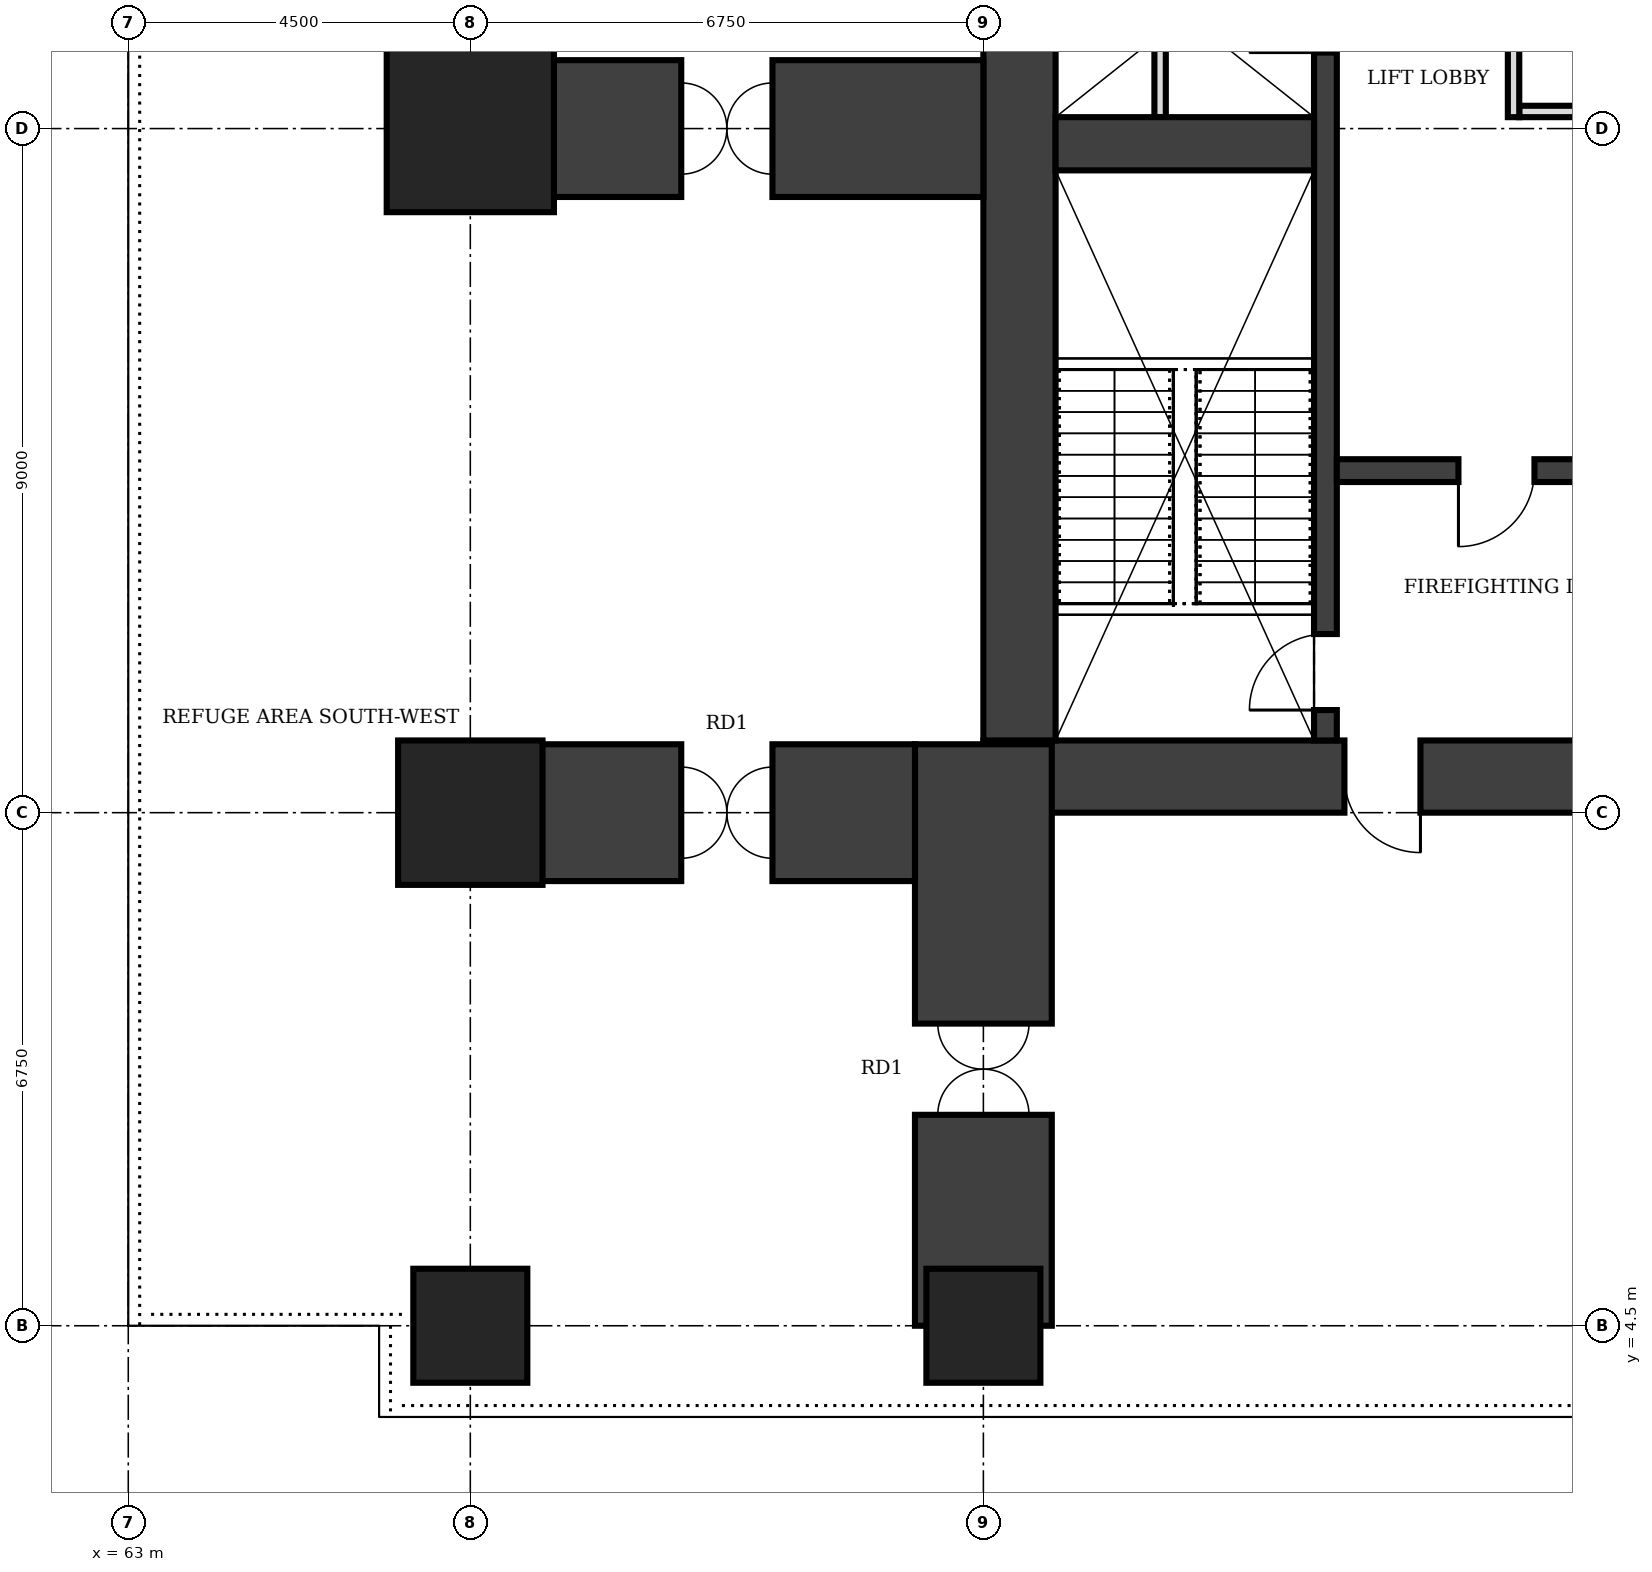
"""IFC4 building model, lengths in metres.
Left out: names, types, materials, properties, quantities, classifications, styles, units other than length and angle.
Written with IfcOpenShell. Run it as: python <this file> out.ifc"""

import sys

from ifc_helpers import new_model, si_unit, direction, frame, frame_2d, origin, origin_2d, place, context, subcontext, project, spatial, rectangle, extrude, element, fill, save


model = new_model("IFC4")
c1 = context("Model", 3, precision=1e-05, world=origin(), true_north=direction((0.0, 1.0)))
c2 = subcontext(c1, "Body", "Model", "MODEL_VIEW")
j1 = project(units=[si_unit("LENGTHUNIT", "METRE"), si_unit("PLANEANGLEUNIT", "RADIAN")], contexts=[c1])
p1 = place(None, origin())
s1 = spatial("IfcSite", under=j1, at=p1, CompositionType="ELEMENT")
p2 = place(p1, origin())
s2 = spatial("IfcBuilding", under=s1, at=p2, CompositionType="ELEMENT")
p3 = place(p2, frame((0.0, 0.0, 169.0)))
s3 = spatial("IfcBuildingStorey", under=s2, at=p3, CompositionType="ELEMENT", Elevation=169.0)
p4 = place(p3, frame((74.25, 11.725, 0.0), z_axis=(0.0, 0.0, 1.0), x_axis=(1.0, 0.0, 0.0)))
e1 = element("IfcWall", 1, at=p4, inside=s3, PredefinedType="SHEAR", context=c2, shape_type="SweptSolid", body=[
    extrude(rectangle(XDim=13.5, YDim=0.95, at=frame_2d((6.75, 0.0))), origin(), (0.0, 0.0, 1.0), 8.0),
])
p5 = place(p4, frame((4.75, 0.0, 0.0)))
e2 = element("IfcOpeningElement", 2, at=p5, cuts=e1, PredefinedType="OPENING", context=c2, shape_type="SweptSolid", body=[
    extrude(rectangle(XDim=1.0, YDim=2.1, at=frame_2d((0.5, 1.05))), frame((0.0, 0.485, 0.0), z_axis=(0.0, -1.0, 0.0), x_axis=(1.0, 0.0, 0.0)), (0.0, 0.0, 1.0), 0.97),
])
p6 = place(p3, frame((74.725, 28.3, 0.0), z_axis=(0.0, 0.0, 1.0), x_axis=(0.0, -1.0, 0.0)))
e3 = element("IfcWall", 3, at=p6, inside=s3, PredefinedType="SHEAR", context=c2, shape_type="SweptSolid", body=[
    extrude(rectangle(XDim=16.1, YDim=0.95, at=frame_2d((8.05, 0.0))), origin(), (0.0, 0.0, 1.0), 8.0),
])
p7 = place(p3, frame((78.75, 12.2, 0.0), z_axis=(0.0, 0.0, 1.0), x_axis=(0.0, 1.0, 0.0)))
e4 = element("IfcWall", 4, at=p7, inside=s3, PredefinedType="SHEAR", context=c2, shape_type="SweptSolid", body=[
    extrude(rectangle(XDim=16.1, YDim=0.3, at=frame_2d((8.05, 0.0))), origin(), (0.0, 0.0, 1.0), 8.0),
])
p8 = place(p7, frame((0.4, 0.0, 0.0)))
e5 = element("IfcOpeningElement", 5, at=p8, cuts=e4, PredefinedType="OPENING", context=c2, shape_type="SweptSolid", body=[
    extrude(rectangle(XDim=1.0, YDim=2.1, at=frame_2d((0.5, 1.05))), frame((0.0, 0.16, 0.0), z_axis=(0.0, -1.0, 0.0), x_axis=(1.0, 0.0, 0.0)), (0.0, 0.0, 1.0), 0.32),
])
p9 = place(p7, frame((14.6, 0.0, 0.0)))
e6 = element("IfcOpeningElement", 6, at=p9, cuts=e4, PredefinedType="OPENING", context=c2, shape_type="SweptSolid", body=[
    extrude(rectangle(XDim=1.1, YDim=2.1, at=frame_2d((0.55, 1.05))), frame((0.0, 0.16, 0.0), z_axis=(0.0, -1.0, 0.0), x_axis=(1.0, 0.0, 0.0)), (0.0, 0.0, 1.0), 0.32),
])
p10 = place(p7, frame((9.05, 0.0, 0.0)))
e7 = element("IfcOpeningElement", 7, at=p10, cuts=e4, PredefinedType="OPENING", context=c2, shape_type="SweptSolid", body=[
    extrude(rectangle(XDim=1.0, YDim=2.1, at=frame_2d((0.5, 1.05))), frame((0.0, 0.16, 0.0), z_axis=(0.0, -1.0, 0.0), x_axis=(1.0, 0.0, 0.0)), (0.0, 0.0, 1.0), 0.32),
])
p11 = place(p7, frame((12.05, 0.0, 0.0)))
e8 = element("IfcOpeningElement", 8, at=p11, cuts=e4, PredefinedType="OPENING", context=c2, shape_type="SweptSolid", body=[
    extrude(rectangle(XDim=1.0, YDim=2.1, at=frame_2d((0.5, 1.05))), frame((0.0, 0.16, 0.0), z_axis=(0.0, -1.0, 0.0), x_axis=(1.0, 0.0, 0.0)), (0.0, 0.0, 1.0), 0.32),
])
p12 = place(p3, frame((75.2, 20.05, 0.0), z_axis=(0.0, 0.0, 1.0), x_axis=(1.0, 0.0, 0.0)))
e9 = element("IfcWall", 9, at=p12, inside=s3, PredefinedType="SHEAR", context=c2, shape_type="SweptSolid", body=[
    extrude(rectangle(XDim=3.4, YDim=0.7, at=frame_2d((1.7, 0.0))), origin(), (0.0, 0.0, 1.0), 8.0),
])
p13 = place(p3, frame((78.9, 15.75, 0.0), z_axis=(0.0, 0.0, 1.0), x_axis=(1.0, 0.0, 0.0)))
e10 = element("IfcWall", 10, at=p13, inside=s3, PredefinedType="SHEAR", context=c2, shape_type="SweptSolid", body=[
    extrude(rectangle(XDim=4.2, YDim=0.3, at=frame_2d((2.1, 0.0))), origin(), (0.0, 0.0, 1.0), 8.0),
])
p14 = place(p13, frame((1.6, 0.0, 0.0)))
e11 = element("IfcOpeningElement", 11, at=p14, cuts=e10, PredefinedType="OPENING", context=c2, shape_type="SweptSolid", body=[
    extrude(rectangle(XDim=1.0, YDim=2.1, at=frame_2d((0.5, 1.05))), frame((0.0, 0.16, 0.0), z_axis=(0.0, -1.0, 0.0), x_axis=(1.0, 0.0, 0.0)), (0.0, 0.0, 1.0), 0.32),
])
for number, where, z_axis, x_axis in (
    (12, (67.5, 4.5, 0.0), (0.0, 0.0, 1.0), (1.0, 0.0, 0.0)),
    (13, (74.25, 4.5, 0.0), (0.0, 0.0, 1.0), (1.0, 0.0, 0.0)),
):
    element("IfcColumn", number, at=place(p3, frame(where, z_axis=z_axis, x_axis=x_axis)), inside=s3, PredefinedType="COLUMN", context=c2, shape_type="SweptSolid", body=[
        extrude(rectangle(XDim=1.5, YDim=1.5, at=origin_2d()), origin(), (0.0, 0.0, 1.0), 8.0),
    ])
p15 = place(p3, frame((67.5, 11.25, 0.0), z_axis=(0.0, 0.0, 1.0), x_axis=(1.0, 0.0, 0.0)))
e14 = element("IfcColumn", 14, at=p15, inside=s3, PredefinedType="COLUMN", context=c2, shape_type="SweptSolid", body=[
    extrude(rectangle(XDim=1.9, YDim=1.9, at=origin_2d()), origin(), (0.0, 0.0, 1.0), 8.0),
])
p16 = place(p3, frame((67.5, 20.25, 0.0), z_axis=(0.0, 0.0, 1.0), x_axis=(1.0, 0.0, 0.0)))
e15 = element("IfcColumn", 15, at=p16, inside=s3, PredefinedType="COLUMN", context=c2, shape_type="SweptSolid", body=[
    extrude(rectangle(XDim=2.2, YDim=2.2, at=origin_2d()), origin(), (0.0, 0.0, 1.0), 8.0),
])
p17 = place(p3, frame((74.25, 4.5, 0.0), z_axis=(0.0, 0.0, 1.0), x_axis=(0.0, 1.0, 0.0)))
e16 = element("IfcWall", 16, at=p17, inside=s3, PredefinedType="SHEAR", context=c2, shape_type="SweptSolid", body=[
    extrude(rectangle(XDim=7.65, YDim=1.8, at=frame_2d((3.825, 0.0))), origin(), (0.0, 0.0, 1.0), 8.0),
])
p18 = place(p17, frame((2.775, 0.0, 0.0)))
e17 = element("IfcOpeningElement", 17, at=p18, cuts=e16, PredefinedType="OPENING", context=c2, shape_type="SweptSolid", body=[
    extrude(rectangle(XDim=1.2, YDim=2.1, at=frame_2d((0.6, 1.05))), frame((0.0, 0.91, 0.0), z_axis=(0.0, -1.0, 0.0), x_axis=(1.0, 0.0, 0.0)), (0.0, 0.0, 1.0), 1.82),
])
p19 = place(p3, frame((67.5, 20.25, 0.0), z_axis=(0.0, 0.0, 1.0), x_axis=(1.0, 0.0, 0.0)))
e18 = element("IfcWall", 18, at=p19, inside=s3, PredefinedType="SHEAR", context=c2, shape_type="SweptSolid", body=[
    extrude(rectangle(XDim=6.75, YDim=1.8, at=frame_2d((3.375, 0.0))), origin(), (0.0, 0.0, 1.0), 8.0),
])
p20 = place(p19, frame((2.775, 0.0, 0.0)))
e19 = element("IfcOpeningElement", 19, at=p20, cuts=e18, PredefinedType="OPENING", context=c2, shape_type="SweptSolid", body=[
    extrude(rectangle(XDim=1.2, YDim=2.1, at=frame_2d((0.6, 1.05))), frame((0.0, 0.91, 0.0), z_axis=(0.0, -1.0, 0.0), x_axis=(1.0, 0.0, 0.0)), (0.0, 0.0, 1.0), 1.82),
])
p21 = place(p3, frame((67.5, 11.25, 0.0), z_axis=(0.0, 0.0, 1.0), x_axis=(1.0, 0.0, 0.0)))
e20 = element("IfcWall", 20, at=p21, inside=s3, PredefinedType="SHEAR", context=c2, shape_type="SweptSolid", body=[
    extrude(rectangle(XDim=5.85, YDim=1.8, at=frame_2d((2.925, 0.0))), origin(), (0.0, 0.0, 1.0), 8.0),
])
p22 = place(p21, frame((2.775, 0.0, 0.0)))
e21 = element("IfcOpeningElement", 21, at=p22, cuts=e20, PredefinedType="OPENING", context=c2, shape_type="SweptSolid", body=[
    extrude(rectangle(XDim=1.2, YDim=2.1, at=frame_2d((0.6, 1.05))), frame((0.0, 0.91, 0.0), z_axis=(0.0, -1.0, 0.0), x_axis=(1.0, 0.0, 0.0)), (0.0, 0.0, 1.0), 1.82),
])
p23 = place(p3, frame((81.225, 20.4, 0.0), z_axis=(0.0, 0.0, 1.0), x_axis=(0.0, 1.0, 0.0)))
e22 = element("IfcWall", 22, at=p23, inside=s3, PredefinedType="PARTITIONING", context=c2, shape_type="SweptSolid", body=[
    extrude(rectangle(XDim=6.0, YDim=0.15, at=frame_2d((3.0, 0.0))), origin(), (0.0, 0.0, 1.0), 7.75),
])
p24 = place(p23, frame((0.9, 0.0, 0.0)))
e23 = element("IfcOpeningElement", 23, at=p24, cuts=e22, PredefinedType="OPENING", context=c2, shape_type="SweptSolid", body=[
    extrude(rectangle(XDim=0.9, YDim=2.1, at=frame_2d((0.45, 1.05))), frame((0.0, 0.085, 0.0), z_axis=(0.0, -1.0, 0.0), x_axis=(1.0, 0.0, 0.0)), (0.0, 0.0, 1.0), 0.17),
])
p25 = place(p23, frame((3.825, 0.0, 0.0)))
e24 = element("IfcOpeningElement", 24, at=p25, cuts=e22, PredefinedType="OPENING", context=c2, shape_type="SweptSolid", body=[
    extrude(rectangle(XDim=0.9, YDim=2.1, at=frame_2d((0.45, 1.05))), frame((0.0, 0.085, 0.0), z_axis=(0.0, -1.0, 0.0), x_axis=(1.0, 0.0, 0.0)), (0.0, 0.0, 1.0), 0.17),
])
p26 = place(p3, frame((81.3, 20.475, 0.0), z_axis=(0.0, 0.0, 1.0), x_axis=(1.0, 0.0, 0.0)))
e25 = element("IfcWall", 25, at=p26, inside=s3, PredefinedType="PARTITIONING", context=c2, shape_type="SweptSolid", body=[
    extrude(rectangle(XDim=1.8, YDim=0.15, at=frame_2d((0.9, 0.0))), origin(), (0.0, 0.0, 1.0), 7.75),
])
p27 = place(p3, frame((76.575, 20.4, 0.0), z_axis=(0.0, 0.0, 1.0), x_axis=(0.0, 1.0, 0.0)))
e26 = element("IfcWall", 26, at=p27, inside=s3, PredefinedType="PARTITIONING", context=c2, shape_type="SweptSolid", body=[
    extrude(rectangle(XDim=2.7, YDim=0.15, at=frame_2d((1.35, 0.0))), origin(), (0.0, 0.0, 1.0), 7.75),
])
p28 = place(p27, frame((0.9, 0.0, 0.0)))
e27 = element("IfcOpeningElement", 27, at=p28, cuts=e26, PredefinedType="OPENING", context=c2, shape_type="SweptSolid", body=[
    extrude(rectangle(XDim=0.9, YDim=2.1, at=frame_2d((0.45, 1.05))), frame((0.0, 0.085, 0.0), z_axis=(0.0, -1.0, 0.0), x_axis=(1.0, 0.0, 0.0)), (0.0, 0.0, 1.0), 0.17),
])
p29 = place(p5, frame((1.0, 0.0, 0.0), z_axis=(0.0, 0.0, 1.0), x_axis=(-1.0, 0.0, 0.0)))
e28 = element("IfcDoor", 28, at=p29, inside=s3, OperationType="SINGLE_SWING_LEFT", PredefinedType="DOOR", context=c2, shape_type="SweptSolid", body=[
    extrude(rectangle(XDim=1.0, YDim=2.1, at=frame_2d((0.5, 1.05))), frame((0.0, 0.025, 0.0), z_axis=(0.0, -1.0, 0.0), x_axis=(1.0, 0.0, 0.0)), (0.0, 0.0, 1.0), 0.05),
])
fill(e2, e28)
p30 = place(p14, frame((1.0, 0.0, 0.0), z_axis=(0.0, 0.0, 1.0), x_axis=(-1.0, 0.0, 0.0)))
e29 = element("IfcDoor", 29, at=p30, inside=s3, OperationType="SINGLE_SWING_RIGHT", PredefinedType="DOOR", context=c2, shape_type="SweptSolid", body=[
    extrude(rectangle(XDim=1.0, YDim=2.1, at=frame_2d((0.5, 1.05))), frame((0.0, 0.025, 0.0), z_axis=(0.0, -1.0, 0.0), x_axis=(1.0, 0.0, 0.0)), (0.0, 0.0, 1.0), 0.05),
])
fill(e11, e29)
p31 = place(p8, origin())
e30 = element("IfcDoor", 30, at=p31, inside=s3, OperationType="SINGLE_SWING_LEFT", PredefinedType="DOOR", context=c2, shape_type="SweptSolid", body=[
    extrude(rectangle(XDim=1.0, YDim=2.1, at=frame_2d((0.5, 1.05))), frame((0.0, 0.025, 0.0), z_axis=(0.0, -1.0, 0.0), x_axis=(1.0, 0.0, 0.0)), (0.0, 0.0, 1.0), 0.05),
])
fill(e5, e30)
p32 = place(p18, origin())
e31 = element("IfcDoor", 31, at=p32, inside=s3, OperationType="DOUBLE_DOOR_DOUBLE_SWING", PredefinedType="DOOR", context=c2, shape_type="SweptSolid", body=[
    extrude(rectangle(XDim=1.2, YDim=2.1, at=frame_2d((0.6, 1.05))), frame((0.0, 0.025, 0.0), z_axis=(0.0, -1.0, 0.0), x_axis=(1.0, 0.0, 0.0)), (0.0, 0.0, 1.0), 0.05),
])
fill(e17, e31)
p33 = place(p20, origin())
e32 = element("IfcDoor", 32, at=p33, inside=s3, OperationType="DOUBLE_DOOR_DOUBLE_SWING", PredefinedType="DOOR", context=c2, shape_type="SweptSolid", body=[
    extrude(rectangle(XDim=1.2, YDim=2.1, at=frame_2d((0.6, 1.05))), frame((0.0, 0.025, 0.0), z_axis=(0.0, -1.0, 0.0), x_axis=(1.0, 0.0, 0.0)), (0.0, 0.0, 1.0), 0.05),
])
fill(e19, e32)
p34 = place(p22, origin())
e33 = element("IfcDoor", 33, at=p34, inside=s3, OperationType="DOUBLE_DOOR_DOUBLE_SWING", PredefinedType="DOOR", context=c2, shape_type="SweptSolid", body=[
    extrude(rectangle(XDim=1.2, YDim=2.1, at=frame_2d((0.6, 1.05))), frame((0.0, 0.025, 0.0), z_axis=(0.0, -1.0, 0.0), x_axis=(1.0, 0.0, 0.0)), (0.0, 0.0, 1.0), 0.05),
])
fill(e21, e33)
save(model, sys.argv[1])
